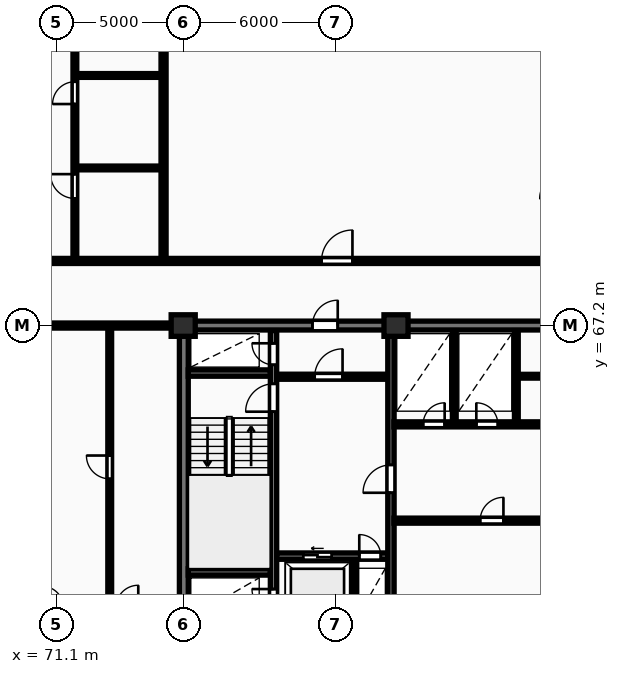
"""IFC4 building model, lengths in metres.
Left out: names, types, materials, properties, quantities, classifications, styles, units other than length and angle.
Written with IfcOpenShell. Run it as: python <this file> out.ifc"""

import sys

from ifc_helpers import new_model, si_unit, direction, frame, frame_2d, origin, origin_2d, place, context, subcontext, project, spatial, rectangle, extrude, element, fill, save


model = new_model("IFC4")
c1 = context("Model", 3, precision=1e-05, world=origin(), true_north=direction((0.0, 1.0)))
c2 = subcontext(c1, "Body", "Model", "MODEL_VIEW")
j1 = project(units=[si_unit("LENGTHUNIT", "METRE"), si_unit("PLANEANGLEUNIT", "RADIAN")], contexts=[c1])
p1 = place(None, origin())
s1 = spatial("IfcSite", under=j1, at=p1, CompositionType="ELEMENT")
p2 = place(p1, origin())
s2 = spatial("IfcBuilding", under=s1, at=p2, CompositionType="ELEMENT")
p3 = place(p2, frame((0.0, 0.0, 113.3)))
s3 = spatial("IfcBuildingStorey", under=s2, at=p3, CompositionType="ELEMENT", Elevation=113.3)
for number, where, z_axis, x_axis in (
    (1, (76.1, 67.2, 0.0), (0.0, 0.0, 1.0), (1.0, 0.0, 0.0)),
    (2, (84.5, 67.2, 0.0), (0.0, 0.0, 1.0), (1.0, 0.0, 0.0)),
):
    element("IfcColumn", number, at=place(p3, frame(where, z_axis=z_axis, x_axis=x_axis)), inside=s3, PredefinedType="COLUMN", context=c2, shape_type="SweptSolid", body=[
        extrude(rectangle(XDim=0.95, YDim=0.85, at=origin_2d()), origin(), (0.0, 0.0, 1.0), 3.25),
    ])
p4 = place(p3, frame((76.125, 55.375, 0.0), z_axis=(0.0, 0.0, 1.0), x_axis=(0.0, 1.0, 0.0)))
e3 = element("IfcWall", 3, at=p4, inside=s3, PredefinedType="SHEAR", context=c2, shape_type="SweptSolid", body=[
    extrude(rectangle(XDim=11.65, YDim=0.35, at=frame_2d((5.825, 0.0))), origin(), (0.0, 0.0, 1.0), 3.25),
])
p5 = place(p3, frame((75.95, 67.2, 0.0), z_axis=(0.0, 0.0, 1.0), x_axis=(1.0, 0.0, 0.0)))
e4 = element("IfcWall", 4, at=p5, inside=s3, PredefinedType="SHEAR", context=c2, shape_type="SweptSolid", body=[
    extrude(rectangle(XDim=36.3, YDim=0.35, at=frame_2d((18.15, 0.0))), origin(), (0.0, 0.0, 1.0), 3.25),
])
p6 = place(p5, frame((5.25, 0.0, 0.0)))
e5 = element("IfcOpeningElement", 5, at=p6, cuts=e4, PredefinedType="OPENING", context=c2, shape_type="SweptSolid", body=[
    extrude(rectangle(XDim=1.0, YDim=2.15, at=frame_2d((0.5, 1.075))), frame((0.0, 0.185, 0.0), z_axis=(0.0, -1.0, 0.0), x_axis=(1.0, 0.0, 0.0)), (0.0, 0.0, 1.0), 0.37),
])
p7 = place(p5, frame((21.6, 0.0, 0.0)))
e6 = element("IfcOpeningElement", 6, at=p7, cuts=e4, PredefinedType="OPENING", context=c2, shape_type="SweptSolid", body=[
    extrude(rectangle(XDim=1.5, YDim=2.2, at=frame_2d((0.75, 1.1))), frame((0.0, 0.185, 0.0), z_axis=(0.0, -1.0, 0.0), x_axis=(1.0, 0.0, 0.0)), (0.0, 0.0, 1.0), 0.37),
])
p8 = place(p5, frame((30.45, 0.0, 0.0)))
e7 = element("IfcOpeningElement", 7, at=p8, cuts=e4, PredefinedType="OPENING", context=c2, shape_type="SweptSolid", body=[
    extrude(rectangle(XDim=1.0, YDim=2.15, at=frame_2d((0.5, 1.075))), frame((0.0, 0.185, 0.0), z_axis=(0.0, -1.0, 0.0), x_axis=(1.0, 0.0, 0.0)), (0.0, 0.0, 1.0), 0.37),
])
p9 = place(p3, frame((79.665, 55.4, 0.0), z_axis=(0.0, 0.0, 1.0), x_axis=(0.0, 1.0, 0.0)))
e8 = element("IfcWall", 8, at=p9, inside=s3, PredefinedType="SHEAR", context=c2, shape_type="SweptSolid", body=[
    extrude(rectangle(XDim=11.6, YDim=0.25, at=frame_2d((5.8, 0.0))), origin(), (0.0, 0.0, 1.0), 3.25),
])
p10 = place(p9, frame((0.55, 0.0, 0.0)))
e9 = element("IfcOpeningElement", 9, at=p10, cuts=e8, PredefinedType="OPENING", context=c2, shape_type="SweptSolid", body=[
    extrude(rectangle(XDim=0.85, YDim=2.05, at=frame_2d((0.425, 1.025))), frame((0.0, 0.135, 0.0), z_axis=(0.0, -1.0, 0.0), x_axis=(1.0, 0.0, 0.0)), (0.0, 0.0, 1.0), 0.27),
])
p11 = place(p9, frame((8.4, 0.0, 0.0)))
e10 = element("IfcOpeningElement", 10, at=p11, cuts=e8, PredefinedType="OPENING", context=c2, shape_type="SweptSolid", body=[
    extrude(rectangle(XDim=1.1, YDim=2.1, at=frame_2d((0.55, 1.05))), frame((0.0, 0.135, 0.0), z_axis=(0.0, -1.0, 0.0), x_axis=(1.0, 0.0, 0.0)), (0.0, 0.0, 1.0), 0.27),
])
p12 = place(p9, frame((10.25, 0.0, 0.0)))
e11 = element("IfcOpeningElement", 11, at=p12, cuts=e8, PredefinedType="OPENING", context=c2, shape_type="SweptSolid", body=[
    extrude(rectangle(XDim=0.85, YDim=2.05, at=frame_2d((0.425, 1.025))), frame((0.0, 0.135, 0.0), z_axis=(0.0, -1.0, 0.0), x_axis=(1.0, 0.0, 0.0)), (0.0, 0.0, 1.0), 0.27),
])
for number, where, z_axis, x_axis in (
    (12, (76.3, 57.475, 0.0), (0.0, 0.0, 1.0), (1.0, 0.0, 0.0)),
    (13, (76.3, 65.325, 0.0), (0.0, 0.0, 1.0), (1.0, 0.0, 0.0)),
):
    element("IfcWall", number, at=place(p3, frame(where, z_axis=z_axis, x_axis=x_axis)), inside=s3, PredefinedType="SHEAR", context=c2, shape_type="SweptSolid", body=[
        extrude(rectangle(XDim=3.24, YDim=0.25, at=frame_2d((1.62, 0.0))), origin(), (0.0, 0.0, 1.0), 3.25),
    ])
p13 = place(p3, frame((79.79, 58.1, 0.0), z_axis=(0.0, 0.0, 1.0), x_axis=(1.0, 0.0, 0.0)))
e14 = element("IfcWall", 14, at=p13, inside=s3, PredefinedType="SHEAR", context=c2, shape_type="SweptSolid", body=[
    extrude(rectangle(XDim=4.39, YDim=0.25, at=frame_2d((2.195, 0.0))), origin(), (0.0, 0.0, 1.0), 3.25),
])
p14 = place(p13, frame((1.05, 0.0, 0.0)))
e15 = element("IfcOpeningElement", 15, at=p14, cuts=e14, PredefinedType="OPENING", context=c2, shape_type="SweptSolid", body=[
    extrude(rectangle(XDim=1.12, YDim=2.12, at=frame_2d((0.56, 1.06))), frame((0.0, 0.135, 0.0), z_axis=(0.0, -1.0, 0.0), x_axis=(1.0, 0.0, 0.0)), (0.0, 0.0, 1.0), 0.27),
])
p15 = place(p13, frame((3.26, 0.0, 0.0)))
e16 = element("IfcOpeningElement", 16, at=p15, cuts=e14, PredefinedType="OPENING", context=c2, shape_type="SweptSolid", body=[
    extrude(rectangle(XDim=0.85, YDim=2.05, at=frame_2d((0.425, 1.025))), frame((0.0, 0.135, 0.0), z_axis=(0.0, -1.0, 0.0), x_axis=(1.0, 0.0, 0.0)), (0.0, 0.0, 1.0), 0.27),
])
p16 = place(p3, frame((82.85, 55.4, 0.0), z_axis=(0.0, 0.0, 1.0), x_axis=(0.0, 1.0, 0.0)))
e17 = element("IfcWall", 17, at=p16, inside=s3, PredefinedType="PARTITIONING", context=c2, shape_type="SweptSolid", body=[
    extrude(rectangle(XDim=2.56, YDim=0.2, at=frame_2d((1.28, 0.0))), origin(), (0.0, 0.0, 1.0), 2.97),
])
p17 = place(p3, frame((79.79, 65.18, 0.0), z_axis=(0.0, 0.0, 1.0), x_axis=(1.0, 0.0, 0.0)))
e18 = element("IfcWall", 18, at=p17, inside=s3, PredefinedType="PARTITIONING", context=c2, shape_type="SweptSolid", body=[
    extrude(rectangle(XDim=4.39, YDim=0.2, at=frame_2d((2.195, 0.0))), origin(), (0.0, 0.0, 1.0), 2.97),
])
p18 = place(p17, frame((1.5, 0.0, 0.0)))
e19 = element("IfcOpeningElement", 19, at=p18, cuts=e18, PredefinedType="OPENING", context=c2, shape_type="SweptSolid", body=[
    extrude(rectangle(XDim=1.1, YDim=2.1, at=frame_2d((0.55, 1.05))), frame((0.0, 0.11, 0.0), z_axis=(0.0, -1.0, 0.0), x_axis=(1.0, 0.0, 0.0)), (0.0, 0.0, 1.0), 0.22),
])
p19 = place(p3, frame((84.3, 55.4, 0.0), z_axis=(0.0, 0.0, 1.0), x_axis=(0.0, 1.0, 0.0)))
e20 = element("IfcWall", 20, at=p19, inside=s3, PredefinedType="SHEAR", context=c2, shape_type="SweptSolid", body=[
    extrude(rectangle(XDim=11.6, YDim=0.25, at=frame_2d((5.8, 0.0))), origin(), (0.0, 0.0, 1.0), 3.25),
])
p20 = place(p19, frame((5.2, 0.0, 0.0)))
e21 = element("IfcOpeningElement", 21, at=p20, cuts=e20, PredefinedType="OPENING", context=c2, shape_type="SweptSolid", body=[
    extrude(rectangle(XDim=1.1, YDim=2.1, at=frame_2d((0.55, 1.05))), frame((0.0, 0.135, 0.0), z_axis=(0.0, -1.0, 0.0), x_axis=(1.0, 0.0, 0.0)), (0.0, 0.0, 1.0), 0.27),
])
p21 = place(p3, frame((84.42, 59.5, 0.0), z_axis=(0.0, 0.0, 1.0), x_axis=(1.0, 0.0, 0.0)))
e22 = element("IfcWall", 22, at=p21, inside=s3, PredefinedType="PARTITIONING", context=c2, shape_type="SweptSolid", body=[
    extrude(rectangle(XDim=8.36, YDim=0.2, at=frame_2d((4.18, 0.0))), origin(), (0.0, 0.0, 1.0), 2.97),
])
p22 = place(p21, frame((3.4, 0.0, 0.0)))
e23 = element("IfcOpeningElement", 23, at=p22, cuts=e22, PredefinedType="OPENING", context=c2, shape_type="SweptSolid", body=[
    extrude(rectangle(XDim=0.92, YDim=2.08, at=frame_2d((0.46, 1.04))), frame((0.0, 0.11, 0.0), z_axis=(0.0, -1.0, 0.0), x_axis=(1.0, 0.0, 0.0)), (0.0, 0.0, 1.0), 0.22),
])
for number, where, z_axis, x_axis in (
    (24, (86.8, 63.4, 0.0), (0.0, 0.0, 1.0), (0.0, 1.0, 0.0)),
    (25, (89.25, 63.4, 0.0), (0.0, 0.0, 1.0), (0.0, 1.0, 0.0)),
):
    element("IfcWall", number, at=place(p3, frame(where, z_axis=z_axis, x_axis=x_axis)), inside=s3, PredefinedType="PARTITIONING", context=c2, shape_type="SweptSolid", body=[
        extrude(rectangle(XDim=3.6, YDim=0.15, at=frame_2d((1.8, 0.0))), origin(), (0.0, 0.0, 1.0), 2.97),
    ])
p23 = place(p3, frame((89.25, 65.2, 0.0), z_axis=(0.0, 0.0, 1.0), x_axis=(1.0, 0.0, 0.0)))
e26 = element("IfcWall", 26, at=p23, inside=s3, PredefinedType="PARTITIONING", context=c2, shape_type="SweptSolid", body=[
    extrude(rectangle(XDim=7.05, YDim=0.15, at=frame_2d((3.525, 0.0))), origin(), (0.0, 0.0, 1.0), 2.97),
])
p24 = place(p23, frame((1.6, 0.0, 0.0)))
e27 = element("IfcOpeningElement", 27, at=p24, cuts=e26, PredefinedType="OPENING", context=c2, shape_type="SweptSolid", body=[
    extrude(rectangle(XDim=0.88, YDim=2.06, at=frame_2d((0.44, 1.03))), frame((0.0, 0.085, 0.0), z_axis=(0.0, -1.0, 0.0), x_axis=(1.0, 0.0, 0.0)), (0.0, 0.0, 1.0), 0.17),
])
p25 = place(p3, frame((84.42, 63.3, 0.0), z_axis=(0.0, 0.0, 1.0), x_axis=(1.0, 0.0, 0.0)))
e28 = element("IfcWall", 28, at=p25, inside=s3, PredefinedType="PARTITIONING", context=c2, shape_type="SweptSolid", body=[
    extrude(rectangle(XDim=19.83, YDim=0.2, at=frame_2d((9.915, 0.0))), origin(), (0.0, 0.0, 1.0), 2.97),
])
p26 = place(p25, frame((1.15, 0.0, 0.0)))
e29 = element("IfcOpeningElement", 29, at=p26, cuts=e28, PredefinedType="OPENING", context=c2, shape_type="SweptSolid", body=[
    extrude(rectangle(XDim=0.85, YDim=2.05, at=frame_2d((0.425, 1.025))), frame((0.0, 0.11, 0.0), z_axis=(0.0, -1.0, 0.0), x_axis=(1.0, 0.0, 0.0)), (0.0, 0.0, 1.0), 0.22),
])
p27 = place(p25, frame((3.25, 0.0, 0.0)))
e30 = element("IfcOpeningElement", 30, at=p27, cuts=e28, PredefinedType="OPENING", context=c2, shape_type="SweptSolid", body=[
    extrude(rectangle(XDim=0.85, YDim=2.05, at=frame_2d((0.425, 1.025))), frame((0.0, 0.11, 0.0), z_axis=(0.0, -1.0, 0.0), x_axis=(1.0, 0.0, 0.0)), (0.0, 0.0, 1.0), 0.22),
])
p28 = place(p25, frame((13.08, 0.0, 0.0)))
e31 = element("IfcOpeningElement", 31, at=p28, cuts=e28, PredefinedType="OPENING", context=c2, shape_type="SweptSolid", body=[
    extrude(rectangle(XDim=1.5, YDim=2.2, at=frame_2d((0.75, 1.1))), frame((0.0, 0.11, 0.0), z_axis=(0.0, -1.0, 0.0), x_axis=(1.0, 0.0, 0.0)), (0.0, 0.0, 1.0), 0.22),
])
p29 = place(p25, frame((6.68, 0.0, 0.0)))
e32 = element("IfcOpeningElement", 32, at=p29, cuts=e28, PredefinedType="OPENING", context=c2, shape_type="SweptSolid", body=[
    extrude(rectangle(XDim=0.92, YDim=2.08, at=frame_2d((0.46, 1.04))), frame((0.0, 0.11, 0.0), z_axis=(0.0, -1.0, 0.0), x_axis=(1.0, 0.0, 0.0)), (0.0, 0.0, 1.0), 0.22),
])
p30 = place(p25, frame((16.33, 0.0, 0.0)))
e33 = element("IfcOpeningElement", 33, at=p30, cuts=e28, PredefinedType="OPENING", context=c2, shape_type="SweptSolid", body=[
    extrude(rectangle(XDim=0.88, YDim=2.06, at=frame_2d((0.44, 1.03))), frame((0.0, 0.11, 0.0), z_axis=(0.0, -1.0, 0.0), x_axis=(1.0, 0.0, 0.0)), (0.0, 0.0, 1.0), 0.22),
])
p31 = place(p3, frame((73.2, 56.07, 0.0), z_axis=(0.0, 0.0, 1.0), x_axis=(0.0, 1.0, 0.0)))
e34 = element("IfcWall", 34, at=p31, inside=s3, PredefinedType="PARTITIONING", context=c2, shape_type="SweptSolid", body=[
    extrude(rectangle(XDim=11.08, YDim=0.15, at=frame_2d((5.54, 0.0))), origin(), (0.0, 0.0, 1.0), 2.97),
])
p32 = place(p31, frame((5.08, 0.0, 0.0)))
e35 = element("IfcOpeningElement", 35, at=p32, cuts=e34, PredefinedType="OPENING", context=c2, shape_type="SweptSolid", body=[
    extrude(rectangle(XDim=0.92, YDim=2.08, at=frame_2d((0.46, 1.04))), frame((0.0, 0.085, 0.0), z_axis=(0.0, -1.0, 0.0), x_axis=(1.0, 0.0, 0.0)), (0.0, 0.0, 1.0), 0.17),
])
p33 = place(p3, frame((57.6, 67.2, 0.0), z_axis=(0.0, 0.0, 1.0), x_axis=(1.0, 0.0, 0.0)))
e36 = element("IfcWall", 36, at=p33, inside=s3, PredefinedType="PARTITIONING", context=c2, shape_type="SweptSolid", body=[
    extrude(rectangle(XDim=18.35, YDim=0.2, at=frame_2d((9.175, 0.0))), origin(), (0.0, 0.0, 1.0), 2.433),
])
p34 = place(p33, frame((12.075, 0.0, 0.0)))
e37 = element("IfcOpeningElement", 37, at=p34, cuts=e36, PredefinedType="OPENING", context=c2, shape_type="SweptSolid", body=[
    extrude(rectangle(XDim=0.95, YDim=2.15, at=frame_2d((0.475, 1.075))), frame((0.0, 0.11, 0.0), z_axis=(0.0, -1.0, 0.0), x_axis=(1.0, 0.0, 0.0)), (0.0, 0.0, 1.0), 0.22),
])
p35 = place(p3, frame((75.325, 69.83, 0.0), z_axis=(0.0, 0.0, 1.0), x_axis=(0.0, 1.0, 0.0)))
e38 = element("IfcWall", 38, at=p35, inside=s3, PredefinedType="PARTITIONING", context=c2, shape_type="SweptSolid", body=[
    extrude(rectangle(XDim=26.07, YDim=0.2, at=frame_2d((13.035, 0.0))), origin(), (0.0, 0.0, 1.0), 2.97),
])
for number, where, z_axis, x_axis in (
    (39, (71.885, 73.42, 0.0), (0.0, 0.0, 1.0), (1.0, 0.0, 0.0)),
    (40, (71.885, 77.07, 0.0), (0.0, 0.0, 1.0), (1.0, 0.0, 0.0)),
):
    element("IfcWall", number, at=place(p3, frame(where, z_axis=z_axis, x_axis=x_axis)), inside=s3, PredefinedType="PARTITIONING", context=c2, shape_type="SweptSolid", body=[
        extrude(rectangle(XDim=3.36, YDim=0.15, at=frame_2d((1.68, 0.0))), origin(), (0.0, 0.0, 1.0), 2.97),
    ])
p36 = place(p3, frame((71.825, 69.81, 0.0), z_axis=(0.0, 0.0, 1.0), x_axis=(0.0, 1.0, 0.0)))
e41 = element("IfcWall", 41, at=p36, inside=s3, PredefinedType="PARTITIONING", context=c2, shape_type="SweptSolid", body=[
    extrude(rectangle(XDim=20.78, YDim=0.15, at=frame_2d((10.39, 0.0))), origin(), (0.0, 0.0, 1.0), 2.97),
])
p37 = place(p36, frame((2.406, 0.0, 0.0)))
e42 = element("IfcOpeningElement", 42, at=p37, cuts=e41, PredefinedType="OPENING", context=c2, shape_type="SweptSolid", body=[
    extrude(rectangle(XDim=0.96, YDim=2.1, at=frame_2d((0.48, 1.05))), frame((0.0, 0.085, 0.0), z_axis=(0.0, -1.0, 0.0), x_axis=(1.0, 0.0, 0.0)), (0.0, 0.0, 1.0), 0.17),
])
p38 = place(p36, frame((6.133, 0.0, 0.0)))
e43 = element("IfcOpeningElement", 43, at=p38, cuts=e41, PredefinedType="OPENING", context=c2, shape_type="SweptSolid", body=[
    extrude(rectangle(XDim=0.88, YDim=2.06, at=frame_2d((0.44, 1.03))), frame((0.0, 0.085, 0.0), z_axis=(0.0, -1.0, 0.0), x_axis=(1.0, 0.0, 0.0)), (0.0, 0.0, 1.0), 0.17),
])
p39 = place(p36, frame((9.97, 0.0, 0.0)))
e44 = element("IfcOpeningElement", 44, at=p39, cuts=e41, PredefinedType="OPENING", context=c2, shape_type="SweptSolid", body=[
    extrude(rectangle(XDim=0.84, YDim=2.04, at=frame_2d((0.42, 1.02))), frame((0.0, 0.085, 0.0), z_axis=(0.0, -1.0, 0.0), x_axis=(1.0, 0.0, 0.0)), (0.0, 0.0, 1.0), 0.17),
])
p40 = place(p3, frame((57.6, 69.75, 0.0), z_axis=(0.0, 0.0, 1.0), x_axis=(1.0, 0.0, 0.0)))
e45 = element("IfcWall", 45, at=p40, inside=s3, PredefinedType="PARTITIONING", context=c2, shape_type="SweptSolid", body=[
    extrude(rectangle(XDim=73.0, YDim=0.2, at=frame_2d((36.5, 0.0))), origin(), (0.0, 0.0, 1.0), 2.97),
])
p41 = place(p40, frame((7.172, 0.0, 0.0)))
e46 = element("IfcOpeningElement", 46, at=p41, cuts=e45, PredefinedType="OPENING", context=c2, shape_type="SweptSolid", body=[
    extrude(rectangle(XDim=1.22, YDim=2.18, at=frame_2d((0.61, 1.09))), frame((0.0, 0.11, 0.0), z_axis=(0.0, -1.0, 0.0), x_axis=(1.0, 0.0, 0.0)), (0.0, 0.0, 1.0), 0.22),
])
p42 = place(p40, frame((23.96, 0.0, 0.0)))
e47 = element("IfcOpeningElement", 47, at=p42, cuts=e45, PredefinedType="OPENING", context=c2, shape_type="SweptSolid", body=[
    extrude(rectangle(XDim=1.22, YDim=2.18, at=frame_2d((0.61, 1.09))), frame((0.0, 0.11, 0.0), z_axis=(0.0, -1.0, 0.0), x_axis=(1.0, 0.0, 0.0)), (0.0, 0.0, 1.0), 0.22),
])
p43 = place(p40, frame((38.846, 0.0, 0.0)))
e48 = element("IfcOpeningElement", 48, at=p43, cuts=e45, PredefinedType="OPENING", context=c2, shape_type="SweptSolid", body=[
    extrude(rectangle(XDim=0.95, YDim=2.15, at=frame_2d((0.475, 1.075))), frame((0.0, 0.11, 0.0), z_axis=(0.0, -1.0, 0.0), x_axis=(1.0, 0.0, 0.0)), (0.0, 0.0, 1.0), 0.22),
])
p44 = place(p40, frame((50.262, 0.0, 0.0)))
e49 = element("IfcOpeningElement", 49, at=p44, cuts=e45, PredefinedType="OPENING", context=c2, shape_type="SweptSolid", body=[
    extrude(rectangle(XDim=0.95, YDim=2.15, at=frame_2d((0.475, 1.075))), frame((0.0, 0.11, 0.0), z_axis=(0.0, -1.0, 0.0), x_axis=(1.0, 0.0, 0.0)), (0.0, 0.0, 1.0), 0.22),
])
p45 = place(p40, frame((63.754, 0.0, 0.0)))
e50 = element("IfcOpeningElement", 50, at=p45, cuts=e45, PredefinedType="OPENING", context=c2, shape_type="SweptSolid", body=[
    extrude(rectangle(XDim=0.95, YDim=2.15, at=frame_2d((0.475, 1.075))), frame((0.0, 0.11, 0.0), z_axis=(0.0, -1.0, 0.0), x_axis=(1.0, 0.0, 0.0)), (0.0, 0.0, 1.0), 0.22),
])
p46 = place(p6, origin())
e51 = element("IfcDoor", 51, at=p46, inside=s3, OperationType="SINGLE_SWING_RIGHT", PredefinedType="DOOR", context=c2, shape_type="SweptSolid", body=[
    extrude(rectangle(XDim=1.0, YDim=2.15, at=frame_2d((0.5, 1.075))), frame((0.0, 0.025, 0.0), z_axis=(0.0, -1.0, 0.0), x_axis=(1.0, 0.0, 0.0)), (0.0, 0.0, 1.0), 0.05),
])
fill(e5, e51)
p47 = place(p10, origin())
e52 = element("IfcDoor", 52, at=p47, inside=s3, OperationType="SINGLE_SWING_RIGHT", PredefinedType="DOOR", context=c2, shape_type="SweptSolid", body=[
    extrude(rectangle(XDim=0.85, YDim=2.05, at=frame_2d((0.425, 1.025))), frame((0.0, 0.025, 0.0), z_axis=(0.0, -1.0, 0.0), x_axis=(1.0, 0.0, 0.0)), (0.0, 0.0, 1.0), 0.05),
])
fill(e9, e52)
p48 = place(p11, origin())
e53 = element("IfcDoor", 53, at=p48, inside=s3, OperationType="SINGLE_SWING_LEFT", PredefinedType="DOOR", context=c2, shape_type="SweptSolid", body=[
    extrude(rectangle(XDim=1.1, YDim=2.1, at=frame_2d((0.55, 1.05))), frame((0.0, 0.025, 0.0), z_axis=(0.0, -1.0, 0.0), x_axis=(1.0, 0.0, 0.0)), (0.0, 0.0, 1.0), 0.05),
])
fill(e10, e53)
p49 = place(p12, origin())
e54 = element("IfcDoor", 54, at=p49, inside=s3, OperationType="SINGLE_SWING_RIGHT", PredefinedType="DOOR", context=c2, shape_type="SweptSolid", body=[
    extrude(rectangle(XDim=0.85, YDim=2.05, at=frame_2d((0.425, 1.025))), frame((0.0, 0.025, 0.0), z_axis=(0.0, -1.0, 0.0), x_axis=(1.0, 0.0, 0.0)), (0.0, 0.0, 1.0), 0.05),
])
fill(e11, e54)
p50 = place(p14, origin())
e55 = element("IfcDoor", 55, at=p50, inside=s3, OperationType="SLIDING_TO_LEFT", PredefinedType="DOOR", context=c2, shape_type="SweptSolid", body=[
    extrude(rectangle(XDim=1.12, YDim=2.12, at=frame_2d((0.56, 1.06))), frame((0.0, 0.025, 0.0), z_axis=(0.0, -1.0, 0.0), x_axis=(1.0, 0.0, 0.0)), (0.0, 0.0, 1.0), 0.05),
])
fill(e15, e55)
p51 = place(p15, origin())
e56 = element("IfcDoor", 56, at=p51, inside=s3, OperationType="SINGLE_SWING_LEFT", PredefinedType="DOOR", context=c2, shape_type="SweptSolid", body=[
    extrude(rectangle(XDim=0.85, YDim=2.05, at=frame_2d((0.425, 1.025))), frame((0.0, 0.025, 0.0), z_axis=(0.0, -1.0, 0.0), x_axis=(1.0, 0.0, 0.0)), (0.0, 0.0, 1.0), 0.05),
])
fill(e16, e56)
p52 = place(p18, origin())
e57 = element("IfcDoor", 57, at=p52, inside=s3, OperationType="SINGLE_SWING_RIGHT", PredefinedType="DOOR", context=c2, shape_type="SweptSolid", body=[
    extrude(rectangle(XDim=1.1, YDim=2.1, at=frame_2d((0.55, 1.05))), frame((0.0, 0.025, 0.0), z_axis=(0.0, -1.0, 0.0), x_axis=(1.0, 0.0, 0.0)), (0.0, 0.0, 1.0), 0.05),
])
fill(e19, e57)
p53 = place(p20, origin())
e58 = element("IfcDoor", 58, at=p53, inside=s3, OperationType="SINGLE_SWING_LEFT", PredefinedType="DOOR", context=c2, shape_type="SweptSolid", body=[
    extrude(rectangle(XDim=1.1, YDim=2.1, at=frame_2d((0.55, 1.05))), frame((0.0, 0.025, 0.0), z_axis=(0.0, -1.0, 0.0), x_axis=(1.0, 0.0, 0.0)), (0.0, 0.0, 1.0), 0.05),
])
fill(e21, e58)
p54 = place(p22, origin())
e59 = element("IfcDoor", 59, at=p54, inside=s3, OperationType="SINGLE_SWING_RIGHT", PredefinedType="DOOR", context=c2, shape_type="SweptSolid", body=[
    extrude(rectangle(XDim=0.92, YDim=2.08, at=frame_2d((0.46, 1.04))), frame((0.0, 0.025, 0.0), z_axis=(0.0, -1.0, 0.0), x_axis=(1.0, 0.0, 0.0)), (0.0, 0.0, 1.0), 0.05),
])
fill(e23, e59)
p55 = place(p26, origin())
e60 = element("IfcDoor", 60, at=p55, inside=s3, OperationType="SINGLE_SWING_RIGHT", PredefinedType="DOOR", context=c2, shape_type="SweptSolid", body=[
    extrude(rectangle(XDim=0.85, YDim=2.05, at=frame_2d((0.425, 1.025))), frame((0.0, 0.025, 0.0), z_axis=(0.0, -1.0, 0.0), x_axis=(1.0, 0.0, 0.0)), (0.0, 0.0, 1.0), 0.05),
])
fill(e29, e60)
p56 = place(p27, origin())
e61 = element("IfcDoor", 61, at=p56, inside=s3, OperationType="SINGLE_SWING_LEFT", PredefinedType="DOOR", context=c2, shape_type="SweptSolid", body=[
    extrude(rectangle(XDim=0.85, YDim=2.05, at=frame_2d((0.425, 1.025))), frame((0.0, 0.025, 0.0), z_axis=(0.0, -1.0, 0.0), x_axis=(1.0, 0.0, 0.0)), (0.0, 0.0, 1.0), 0.05),
])
fill(e30, e61)
p57 = place(p32, origin())
e62 = element("IfcDoor", 62, at=p57, inside=s3, OperationType="SINGLE_SWING_RIGHT", PredefinedType="DOOR", context=c2, shape_type="SweptSolid", body=[
    extrude(rectangle(XDim=0.92, YDim=2.08, at=frame_2d((0.46, 1.04))), frame((0.0, 0.025, 0.0), z_axis=(0.0, -1.0, 0.0), x_axis=(1.0, 0.0, 0.0)), (0.0, 0.0, 1.0), 0.05),
])
fill(e35, e62)
p58 = place(p37, origin())
e63 = element("IfcDoor", 63, at=p58, inside=s3, OperationType="SINGLE_SWING_RIGHT", PredefinedType="DOOR", context=c2, shape_type="SweptSolid", body=[
    extrude(rectangle(XDim=0.96, YDim=2.1, at=frame_2d((0.48, 1.05))), frame((0.0, 0.025, 0.0), z_axis=(0.0, -1.0, 0.0), x_axis=(1.0, 0.0, 0.0)), (0.0, 0.0, 1.0), 0.05),
])
fill(e42, e63)
p59 = place(p38, origin())
e64 = element("IfcDoor", 64, at=p59, inside=s3, OperationType="SINGLE_SWING_LEFT", PredefinedType="DOOR", context=c2, shape_type="SweptSolid", body=[
    extrude(rectangle(XDim=0.88, YDim=2.06, at=frame_2d((0.44, 1.03))), frame((0.0, 0.025, 0.0), z_axis=(0.0, -1.0, 0.0), x_axis=(1.0, 0.0, 0.0)), (0.0, 0.0, 1.0), 0.05),
])
fill(e43, e64)
p60 = place(p42, origin())
e65 = element("IfcDoor", 65, at=p60, inside=s3, OperationType="SINGLE_SWING_RIGHT", PredefinedType="DOOR", context=c2, shape_type="SweptSolid", body=[
    extrude(rectangle(XDim=1.22, YDim=2.18, at=frame_2d((0.61, 1.09))), frame((0.0, 0.025, 0.0), z_axis=(0.0, -1.0, 0.0), x_axis=(1.0, 0.0, 0.0)), (0.0, 0.0, 1.0), 0.05),
])
fill(e47, e65)
save(model, sys.argv[1])
